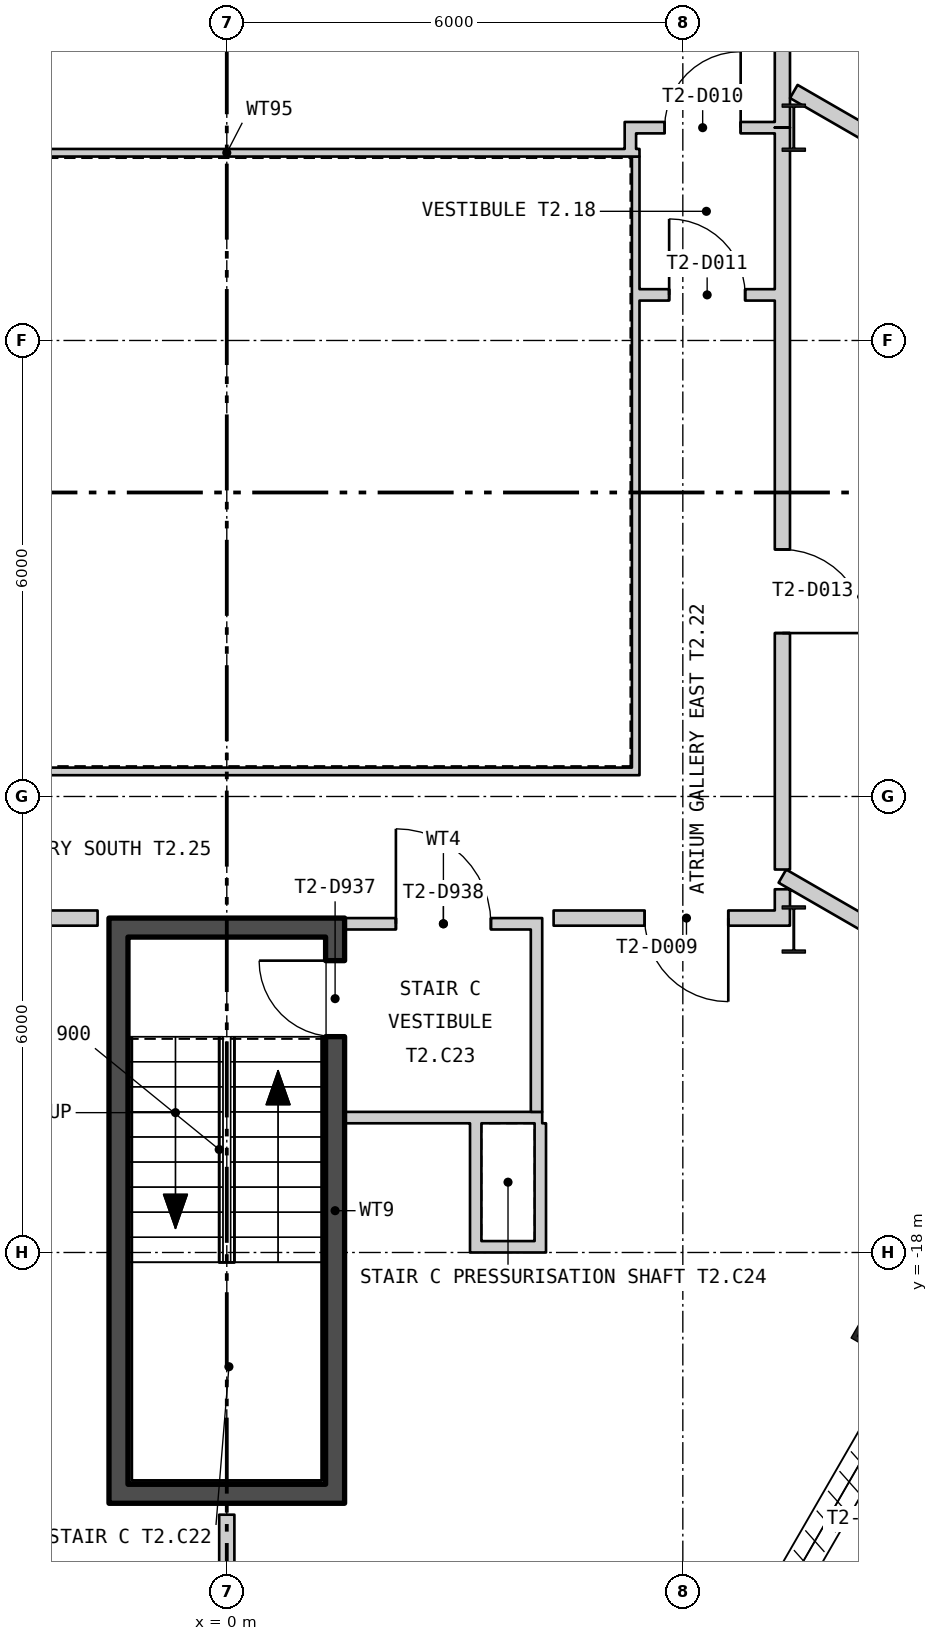
"""IFC4 building model, lengths in metres.
Left out: names, types, materials, properties, quantities, classifications, styles, units other than length and angle.
Written with IfcOpenShell. Run it as: python <this file> out.ifc"""

import sys

from ifc_helpers import new_model, si_unit, direction, frame, frame_2d, origin, origin_2d, place, context, subcontext, project, spatial, polyline, rectangle, hollow_rectangle, i_section, outline, extrude, element, fill, save


model = new_model("IFC4")
c1 = context("Model", 3, precision=1e-05, world=origin(), true_north=direction((0.0, 1.0)))
c2 = subcontext(c1, "Body", "Model", "MODEL_VIEW")
j1 = project(units=[si_unit("LENGTHUNIT", "METRE"), si_unit("PLANEANGLEUNIT", "RADIAN")], contexts=[c1])
p1 = place(None, origin())
s1 = spatial("IfcSite", under=j1, at=p1, CompositionType="ELEMENT")
p2 = place(p1, origin())
s2 = spatial("IfcBuilding", under=s1, at=p2, CompositionType="ELEMENT")
p3 = place(p2, frame((0.0, 0.0, 133.8)))
s3 = spatial("IfcBuildingStorey", under=s2, at=p3, CompositionType="ELEMENT", Elevation=133.8)
p4 = place(p3, frame((8.667, -19.039, 0.0), z_axis=(0.0, 0.0, 1.0), x_axis=(0.5, 0.866025403784, 0.0)))
e1 = element("IfcColumn", 1, at=p4, inside=s3, PredefinedType="COLUMN", context=c2, shape_type="SweptSolid", body=[
    extrude(hollow_rectangle(XDim=0.6, YDim=0.7, WallThickness=0.06, at=origin_2d()), origin(), (0.0, 0.0, 1.0), 6.0),
])
for number, where, z_axis, x_axis in (
    (2, (7.46, -3.2, 0.0), (0.0, 0.0, 1.0), (1.0, 0.0, 0.0)),
    (3, (7.46, -13.75, 0.0), (0.0, 0.0, 1.0), (1.0, 0.0, 0.0)),
):
    element("IfcColumn", number, at=place(p3, frame(where, z_axis=z_axis, x_axis=x_axis)), inside=s3, PredefinedType="COLUMN", context=c2, shape_type="SweptSolid", body=[
        extrude(i_section(OverallWidth=0.305, OverallDepth=0.62, WebThickness=0.021, FlangeThickness=0.04, at=origin_2d()), origin(), (0.0, 0.0, 1.0), 6.0),
    ])
p5 = place(p3, frame((4.49, -27.423, -0.18), z_axis=(0.0, 0.0, 1.0), x_axis=(0.500000335318, 0.866025210188, 0.0)))
e4 = element("IfcWall", 4, at=p5, inside=s3, PredefinedType="SOLIDWALL", context=c2, shape_type="SweptSolid", body=[
    extrude(outline(polyline([(-0.13, -0.225), (45.88, -0.225), (45.62, 0.225), (0.13, 0.225), (-0.13, -0.225)])), origin(), (0.0, 0.0, 1.0), 6.0),
])
p6 = place(p5, frame((1.425, 0.0, 1.38)))
e5 = element("IfcOpeningElement", 5, at=p6, cuts=e4, PredefinedType="OPENING", context=c2, shape_type="SweptSolid", body=[
    extrude(rectangle(XDim=2.4, YDim=3.6, at=frame_2d((1.2, 1.8))), frame((0.0, 0.235, 0.0), z_axis=(0.0, -1.0, 0.0), x_axis=(1.0, 0.0, 0.0)), (0.0, 0.0, 1.0), 0.47),
])
p7 = place(p5, frame((5.895, 0.0, 1.38)))
e6 = element("IfcOpeningElement", 6, at=p7, cuts=e4, PredefinedType="OPENING", context=c2, shape_type="SweptSolid", body=[
    extrude(rectangle(XDim=2.4, YDim=3.6, at=frame_2d((1.2, 1.8))), frame((0.0, 0.235, 0.0), z_axis=(0.0, -1.0, 0.0), x_axis=(1.0, 0.0, 0.0)), (0.0, 0.0, 1.0), 0.47),
])
p8 = place(p5, frame((10.403, 0.0, 1.38)))
e7 = element("IfcOpeningElement", 7, at=p8, cuts=e4, PredefinedType="OPENING", context=c2, shape_type="SweptSolid", body=[
    extrude(rectangle(XDim=2.4, YDim=3.6, at=frame_2d((1.2, 1.8))), frame((0.0, 0.235, 0.0), z_axis=(0.0, -1.0, 0.0), x_axis=(1.0, 0.0, 0.0)), (0.0, 0.0, 1.0), 0.47),
])
p9 = place(p5, frame((14.912, 0.0, 1.38)))
e8 = element("IfcOpeningElement", 8, at=p9, cuts=e4, PredefinedType="OPENING", context=c2, shape_type="SweptSolid", body=[
    extrude(rectangle(XDim=2.4, YDim=3.6, at=frame_2d((1.2, 1.8))), frame((0.0, 0.235, 0.0), z_axis=(0.0, -1.0, 0.0), x_axis=(1.0, 0.0, 0.0)), (0.0, 0.0, 1.0), 0.47),
])
p10 = place(p5, frame((19.421, 0.0, 1.38)))
e9 = element("IfcOpeningElement", 9, at=p10, cuts=e4, PredefinedType="OPENING", context=c2, shape_type="SweptSolid", body=[
    extrude(rectangle(XDim=2.4, YDim=3.6, at=frame_2d((1.2, 1.8))), frame((0.0, 0.235, 0.0), z_axis=(0.0, -1.0, 0.0), x_axis=(1.0, 0.0, 0.0)), (0.0, 0.0, 1.0), 0.47),
])
p11 = place(p5, frame((23.929, 0.0, 1.38)))
e10 = element("IfcOpeningElement", 10, at=p11, cuts=e4, PredefinedType="OPENING", context=c2, shape_type="SweptSolid", body=[
    extrude(rectangle(XDim=2.4, YDim=3.6, at=frame_2d((1.2, 1.8))), frame((0.0, 0.235, 0.0), z_axis=(0.0, -1.0, 0.0), x_axis=(1.0, 0.0, 0.0)), (0.0, 0.0, 1.0), 0.47),
])
p12 = place(p5, frame((28.438, 0.0, 1.38)))
e11 = element("IfcOpeningElement", 11, at=p12, cuts=e4, PredefinedType="OPENING", context=c2, shape_type="SweptSolid", body=[
    extrude(rectangle(XDim=2.4, YDim=3.6, at=frame_2d((1.2, 1.8))), frame((0.0, 0.235, 0.0), z_axis=(0.0, -1.0, 0.0), x_axis=(1.0, 0.0, 0.0)), (0.0, 0.0, 1.0), 0.47),
])
p13 = place(p5, frame((32.947, 0.0, 1.38)))
e12 = element("IfcOpeningElement", 12, at=p13, cuts=e4, PredefinedType="OPENING", context=c2, shape_type="SweptSolid", body=[
    extrude(rectangle(XDim=2.4, YDim=3.6, at=frame_2d((1.2, 1.8))), frame((0.0, 0.235, 0.0), z_axis=(0.0, -1.0, 0.0), x_axis=(1.0, 0.0, 0.0)), (0.0, 0.0, 1.0), 0.47),
])
p14 = place(p5, frame((37.455, 0.0, 1.38)))
e13 = element("IfcOpeningElement", 13, at=p14, cuts=e4, PredefinedType="OPENING", context=c2, shape_type="SweptSolid", body=[
    extrude(rectangle(XDim=2.4, YDim=3.6, at=frame_2d((1.2, 1.8))), frame((0.0, 0.235, 0.0), z_axis=(0.0, -1.0, 0.0), x_axis=(1.0, 0.0, 0.0)), (0.0, 0.0, 1.0), 0.47),
])
p15 = place(p5, frame((41.925, 0.0, 1.38)))
e14 = element("IfcOpeningElement", 14, at=p15, cuts=e4, PredefinedType="OPENING", context=c2, shape_type="SweptSolid", body=[
    extrude(rectangle(XDim=2.4, YDim=3.6, at=frame_2d((1.2, 1.8))), frame((0.0, 0.235, 0.0), z_axis=(0.0, -1.0, 0.0), x_axis=(1.0, 0.0, 0.0)), (0.0, 0.0, 1.0), 0.47),
])
p16 = place(p3, frame((-5.43, -11.67, 0.0), z_axis=(0.0, 0.0, 1.0), x_axis=(1.0, 0.0, 0.0)))
e15 = element("IfcWall", 15, at=p16, inside=s3, PredefinedType="PARTITIONING", context=c2, shape_type="SweptSolid", body=[
    extrude(rectangle(XDim=10.86, YDim=0.1, at=frame_2d((5.43, 0.0))), origin(), (0.0, 0.0, 1.0), 5.8),
])
p17 = place(p3, frame((5.38, -11.62, 0.0), z_axis=(0.0, 0.0, 1.0), x_axis=(0.0, 1.0, 0.0)))
e16 = element("IfcWall", 16, at=p17, inside=s3, PredefinedType="PARTITIONING", context=c2, shape_type="SweptSolid", body=[
    extrude(rectangle(XDim=8.04, YDim=0.1, at=frame_2d((4.02, 0.0))), origin(), (0.0, 0.0, 1.0), 5.8),
])
p18 = place(p3, frame((5.43, -3.53, 0.0), z_axis=(0.0, 0.0, 1.0), x_axis=(-1.0, 0.0, 0.0)))
e17 = element("IfcWall", 17, at=p18, inside=s3, PredefinedType="PARTITIONING", context=c2, shape_type="SweptSolid", body=[
    extrude(rectangle(XDim=10.86, YDim=0.1, at=frame_2d((5.43, 0.0))), origin(), (0.0, 0.0, 1.0), 5.8),
])
p19 = place(p3, frame((-1.425, -21.05, 0.0), z_axis=(0.0, 0.0, 1.0), x_axis=(0.0, 1.0, 0.0)))
e18 = element("IfcWall", 18, at=p19, inside=s3, PredefinedType="SHEAR", context=c2, shape_type="SweptSolid", body=[
    extrude(rectangle(XDim=7.2, YDim=0.25, at=frame_2d((3.6, 0.0))), origin(), (0.0, 0.0, 1.0), 5.8),
])
p20 = place(p3, frame((1.425, -21.05, 0.0), z_axis=(0.0, 0.0, 1.0), x_axis=(0.0, 1.0, 0.0)))
e19 = element("IfcWall", 19, at=p20, inside=s3, PredefinedType="SHEAR", context=c2, shape_type="SweptSolid", body=[
    extrude(rectangle(XDim=7.2, YDim=0.25, at=frame_2d((3.6, 0.0))), origin(), (0.0, 0.0, 1.0), 5.8),
])
p21 = place(p20, frame((5.89, 0.0, 0.0)))
e20 = element("IfcOpeningElement", 20, at=p21, cuts=e19, PredefinedType="OPENING", context=c2, shape_type="SweptSolid", body=[
    extrude(rectangle(XDim=1.0, YDim=2.1, at=frame_2d((0.5, 1.05))), frame((0.0, 0.135, 0.0), z_axis=(0.0, -1.0, 0.0), x_axis=(1.0, 0.0, 0.0)), (0.0, 0.0, 1.0), 0.27),
])
for number, where, z_axis, x_axis in (
    (21, (-1.55, -21.175, 0.0), (0.0, 0.0, 1.0), (1.0, 0.0, 0.0)),
    (22, (-1.55, -13.725, 0.0), (0.0, 0.0, 1.0), (1.0, 0.0, 0.0)),
):
    element("IfcWall", number, at=place(p3, frame(where, z_axis=z_axis, x_axis=x_axis)), inside=s3, PredefinedType="SHEAR", context=c2, shape_type="SweptSolid", body=[
        extrude(rectangle(XDim=3.1, YDim=0.25, at=frame_2d((1.55, 0.0))), origin(), (0.0, 0.0, 1.0), 5.8),
    ])
p22 = place(p3, frame((1.55, -16.225, 0.0), z_axis=(0.0, 0.0, 1.0), x_axis=(1.0, 0.0, 0.0)))
e23 = element("IfcWall", 23, at=p22, inside=s3, PredefinedType="PARTITIONING", context=c2, shape_type="SweptSolid", body=[
    extrude(rectangle(XDim=2.6, YDim=0.15, at=frame_2d((1.3, 0.0))), origin(), (0.0, 0.0, 1.0), 5.8),
])
p23 = place(p3, frame((4.075, -16.15, 0.0), z_axis=(0.0, 0.0, 1.0), x_axis=(0.0, 1.0, 0.0)))
e24 = element("IfcWall", 24, at=p23, inside=s3, PredefinedType="PARTITIONING", context=c2, shape_type="SweptSolid", body=[
    extrude(rectangle(XDim=2.4, YDim=0.15, at=frame_2d((1.2, 0.0))), origin(), (0.0, 0.0, 1.0), 5.8),
])
p24 = place(p3, frame((1.55, -13.675, 0.0), z_axis=(0.0, 0.0, 1.0), x_axis=(1.0, 0.0, 0.0)))
e25 = element("IfcWall", 25, at=p24, inside=s3, PredefinedType="PARTITIONING", context=c2, shape_type="SweptSolid", body=[
    extrude(rectangle(XDim=2.6, YDim=0.15, at=frame_2d((1.3, 0.0))), origin(), (0.0, 0.0, 1.0), 4.89),
])
p25 = place(p24, frame((0.675, 0.0, 0.0)))
e26 = element("IfcOpeningElement", 26, at=p25, cuts=e25, PredefinedType="OPENING", context=c2, shape_type="SweptSolid", body=[
    extrude(rectangle(XDim=1.25, YDim=2.1, at=frame_2d((0.625, 1.05))), frame((0.0, 0.085, 0.0), z_axis=(0.0, -1.0, 0.0), x_axis=(1.0, 0.0, 0.0)), (0.0, 0.0, 1.0), 0.17),
])
p26 = place(p3, frame((3.275, -18.0, 0.0), z_axis=(0.0, 0.0, 1.0), x_axis=(0.0, 1.0, 0.0)))
e27 = element("IfcWall", 27, at=p26, inside=s3, PredefinedType="PARTITIONING", context=c2, shape_type="SweptSolid", body=[
    extrude(rectangle(XDim=1.7, YDim=0.15, at=frame_2d((0.85, 0.0))), origin(), (0.0, 0.0, 1.0), 5.11),
])
p27 = place(p3, frame((3.35, -17.925, 0.0), z_axis=(0.0, 0.0, 1.0), x_axis=(1.0, 0.0, 0.0)))
e28 = element("IfcWall", 28, at=p27, inside=s3, PredefinedType="PARTITIONING", context=c2, shape_type="SweptSolid", body=[
    extrude(rectangle(XDim=0.7, YDim=0.15, at=frame_2d((0.35, 0.0))), origin(), (0.0, 0.0, 1.0), 5.8),
])
p28 = place(p3, frame((4.125, -18.0, 0.0), z_axis=(0.0, 0.0, 1.0), x_axis=(0.0, 1.0, 0.0)))
e29 = element("IfcWall", 29, at=p28, inside=s3, PredefinedType="PARTITIONING", context=c2, shape_type="SweptSolid", body=[
    extrude(rectangle(XDim=1.7, YDim=0.15, at=frame_2d((0.85, 0.0))), origin(), (0.0, 0.0, 1.0), 5.8),
])
p29 = place(p3, frame((-7.21, -13.6, 0.0), z_axis=(0.0, 0.0, 1.0), x_axis=(1.0, 0.0, 0.0)))
e30 = element("IfcWall", 30, at=p29, inside=s3, PredefinedType="PARTITIONING", context=c2, shape_type="SweptSolid", body=[
    extrude(rectangle(XDim=5.51, YDim=0.2, at=frame_2d((2.755, 0.0))), origin(), (0.0, 0.0, 1.0), 4.89),
])
p30 = place(p29, frame((3.098, 0.0, 0.0)))
e31 = element("IfcOpeningElement", 31, at=p30, cuts=e30, PredefinedType="OPENING", context=c2, shape_type="SweptSolid", body=[
    extrude(rectangle(XDim=1.1, YDim=2.1, at=frame_2d((0.55, 1.05))), frame((0.0, 0.11, 0.0), z_axis=(0.0, -1.0, 0.0), x_axis=(1.0, 0.0, 0.0)), (0.0, 0.0, 1.0), 0.22),
])
p31 = place(p3, frame((0.0, -26.748, 0.0), z_axis=(0.0, 0.0, 1.0), x_axis=(0.0, 1.0, 0.0)))
e32 = element("IfcWall", 32, at=p31, inside=s3, PredefinedType="PARTITIONING", context=c2, shape_type="SweptSolid", body=[
    extrude(rectangle(XDim=5.298, YDim=0.2, at=frame_2d((2.649, 0.0))), origin(), (0.0, 0.0, 1.0), 5.25),
])
p32 = place(p3, frame((4.3, -13.6, 0.0), z_axis=(0.0, 0.0, 1.0), x_axis=(1.0, 0.0, 0.0)))
e33 = element("IfcWall", 33, at=p32, inside=s3, PredefinedType="PARTITIONING", context=c2, shape_type="SweptSolid", body=[
    extrude(rectangle(XDim=3.109, YDim=0.2, at=frame_2d((1.554, 0.0))), origin(), (0.0, 0.0, 1.0), 4.89),
])
p33 = place(p32, frame((1.198, 0.0, 0.0)))
e34 = element("IfcOpeningElement", 34, at=p33, cuts=e33, PredefinedType="OPENING", context=c2, shape_type="SweptSolid", body=[
    extrude(rectangle(XDim=1.1, YDim=2.1, at=frame_2d((0.55, 1.05))), frame((0.0, 0.11, 0.0), z_axis=(0.0, -1.0, 0.0), x_axis=(1.0, 0.0, 0.0)), (0.0, 0.0, 1.0), 0.22),
])
p34 = place(p3, frame((5.235, -3.2, 0.0), z_axis=(0.0, 0.0, 1.0), x_axis=(1.0, 0.0, 0.0)))
e35 = element("IfcWall", 35, at=p34, inside=s3, PredefinedType="PARTITIONING", context=c2, shape_type="SweptSolid", body=[
    extrude(rectangle(XDim=1.975, YDim=0.15, at=frame_2d((0.988, 0.0))), origin(), (0.0, 0.0, 1.0), 4.89),
])
p35 = place(p34, frame((0.526, 0.0, 0.0)))
e36 = element("IfcOpeningElement", 36, at=p35, cuts=e35, PredefinedType="OPENING", context=c2, shape_type="SweptSolid", body=[
    extrude(rectangle(XDim=1.0, YDim=2.1, at=frame_2d((0.5, 1.05))), frame((0.0, 0.085, 0.0), z_axis=(0.0, -1.0, 0.0), x_axis=(1.0, 0.0, 0.0)), (0.0, 0.0, 1.0), 0.17),
])
p36 = place(p3, frame((5.31, -3.48, 0.0), z_axis=(0.0, 0.0, 1.0), x_axis=(0.0, 1.0, 0.0)))
e37 = element("IfcWall", 37, at=p36, inside=s3, PredefinedType="PARTITIONING", context=c2, shape_type="SweptSolid", body=[
    extrude(rectangle(XDim=0.205, YDim=0.15, at=frame_2d((0.102, 0.0))), origin(), (0.0, 0.0, 1.0), 5.8),
])
p37 = place(p3, frame((5.43, -5.4, 0.0), z_axis=(0.0, 0.0, 1.0), x_axis=(1.0, 0.0, 0.0)))
e38 = element("IfcWall", 38, at=p37, inside=s3, PredefinedType="PARTITIONING", context=c2, shape_type="SweptSolid", body=[
    extrude(rectangle(XDim=1.78, YDim=0.15, at=frame_2d((0.89, 0.0))), origin(), (0.0, 0.0, 1.0), 5.8),
])
p38 = place(p37, frame((0.39, 0.0, 0.0)))
e39 = element("IfcOpeningElement", 39, at=p38, cuts=e38, PredefinedType="OPENING", context=c2, shape_type="SweptSolid", body=[
    extrude(rectangle(XDim=1.0, YDim=2.1, at=frame_2d((0.5, 1.05))), frame((0.0, 0.085, 0.0), z_axis=(0.0, -1.0, 0.0), x_axis=(1.0, 0.0, 0.0)), (0.0, 0.0, 1.0), 0.17),
])
p39 = place(p3, frame((7.31, -13.5, 0.0), z_axis=(0.0, 0.0, 1.0), x_axis=(0.0, 1.0, 0.0)))
e40 = element("IfcWall", 40, at=p39, inside=s3, PredefinedType="PARTITIONING", context=c2, shape_type="SweptSolid", body=[
    extrude(rectangle(XDim=0.279, YDim=0.2, at=frame_2d((0.14, 0.0))), origin(), (0.0, 0.0, 1.0), 5.8),
])
p40 = place(p3, frame((7.31, -13.048, 0.0), z_axis=(0.0, 0.0, 1.0), x_axis=(0.866042392862, -0.4999705729, 0.0)))
e41 = element("IfcWall", 41, at=p40, inside=s3, PredefinedType="PARTITIONING", context=c2, shape_type="SweptSolid", body=[
    extrude(rectangle(XDim=4.07, YDim=0.2, at=frame_2d((2.035, 0.0))), origin(), (0.0, 0.0, 1.0), 5.8),
])
p41 = place(p3, frame((7.31, -12.961, 0.0), z_axis=(0.0, 0.0, 1.0), x_axis=(0.0, 1.0, 0.0)))
e42 = element("IfcWall", 42, at=p41, inside=s3, PredefinedType="PARTITIONING", context=c2, shape_type="SweptSolid", body=[
    extrude(rectangle(XDim=9.761, YDim=0.2, at=frame_2d((4.88, 0.0))), origin(), (0.0, 0.0, 1.0), 5.21),
])
p42 = place(p41, frame((3.111, 0.0, 0.0)))
e43 = element("IfcOpeningElement", 43, at=p42, cuts=e42, PredefinedType="OPENING", context=c2, shape_type="SweptSolid", body=[
    extrude(rectangle(XDim=1.1, YDim=2.1, at=frame_2d((0.55, 1.05))), frame((0.0, 0.11, 0.0), z_axis=(0.0, -1.0, 0.0), x_axis=(1.0, 0.0, 0.0)), (0.0, 0.0, 1.0), 0.22),
])
p43 = place(p3, frame((7.31, -3.2, 0.0), z_axis=(0.0, 0.0, 1.0), x_axis=(0.0, 1.0, 0.0)))
e44 = element("IfcWall", 44, at=p43, inside=s3, PredefinedType="PARTITIONING", context=c2, shape_type="SweptSolid", body=[
    extrude(rectangle(XDim=1.301, YDim=0.2, at=frame_2d((0.65, 0.0))), origin(), (0.0, 0.0, 1.0), 5.8),
])
p44 = place(p3, frame((7.46, -2.724, 0.0), z_axis=(0.0, 0.0, 1.0), x_axis=(0.866112420066, -0.499849253082, 0.0)))
e45 = element("IfcWall", 45, at=p44, inside=s3, PredefinedType="PARTITIONING", context=c2, shape_type="SweptSolid", body=[
    extrude(rectangle(XDim=9.103, YDim=0.2, at=frame_2d((4.551, 0.0))), origin(), (0.0, 0.0, 1.0), 5.8),
])
p45 = place(p21, origin())
e46 = element("IfcDoor", 46, at=p45, inside=s3, OperationType="SINGLE_SWING_LEFT", PredefinedType="DOOR", context=c2, shape_type="SweptSolid", body=[
    extrude(rectangle(XDim=1.0, YDim=2.1, at=frame_2d((0.5, 1.05))), frame((0.0, 0.025, 0.0), z_axis=(0.0, -1.0, 0.0), x_axis=(1.0, 0.0, 0.0)), (0.0, 0.0, 1.0), 0.05),
])
fill(e20, e46)
p46 = place(p25, origin())
e47 = element("IfcDoor", 47, at=p46, inside=s3, OperationType="SINGLE_SWING_RIGHT", PredefinedType="DOOR", context=c2, shape_type="SweptSolid", body=[
    extrude(rectangle(XDim=1.25, YDim=2.1, at=frame_2d((0.625, 1.05))), frame((0.0, 0.025, 0.0), z_axis=(0.0, -1.0, 0.0), x_axis=(1.0, 0.0, 0.0)), (0.0, 0.0, 1.0), 0.05),
])
fill(e26, e47)
p47 = place(p33, origin())
e48 = element("IfcDoor", 48, at=p47, inside=s3, OperationType="SINGLE_SWING_RIGHT", PredefinedType="DOOR", context=c2, shape_type="SweptSolid", body=[
    extrude(rectangle(XDim=1.1, YDim=2.1, at=frame_2d((0.55, 1.05))), frame((0.0, 0.025, 0.0), z_axis=(0.0, -1.0, 0.0), x_axis=(1.0, 0.0, 0.0)), (0.0, 0.0, 1.0), 0.05),
])
fill(e34, e48)
p48 = place(p35, origin())
e49 = element("IfcDoor", 49, at=p48, inside=s3, OperationType="SINGLE_SWING_LEFT", PredefinedType="DOOR", context=c2, shape_type="SweptSolid", body=[
    extrude(rectangle(XDim=1.0, YDim=2.1, at=frame_2d((0.5, 1.05))), frame((0.0, 0.025, 0.0), z_axis=(0.0, -1.0, 0.0), x_axis=(1.0, 0.0, 0.0)), (0.0, 0.0, 1.0), 0.05),
])
fill(e36, e49)
p49 = place(p38, origin())
e50 = element("IfcDoor", 50, at=p49, inside=s3, OperationType="SINGLE_SWING_RIGHT", PredefinedType="DOOR", context=c2, shape_type="SweptSolid", body=[
    extrude(rectangle(XDim=1.0, YDim=2.1, at=frame_2d((0.5, 1.05))), frame((0.0, 0.025, 0.0), z_axis=(0.0, -1.0, 0.0), x_axis=(1.0, 0.0, 0.0)), (0.0, 0.0, 1.0), 0.05),
])
fill(e39, e50)
p50 = place(p42, origin())
e51 = element("IfcDoor", 51, at=p50, inside=s3, OperationType="SINGLE_SWING_LEFT", PredefinedType="DOOR", context=c2, shape_type="SweptSolid", body=[
    extrude(rectangle(XDim=1.1, YDim=2.1, at=frame_2d((0.55, 1.05))), frame((0.0, 0.025, 0.0), z_axis=(0.0, -1.0, 0.0), x_axis=(1.0, 0.0, 0.0)), (0.0, 0.0, 1.0), 0.05),
])
fill(e43, e51)
save(model, sys.argv[1])
